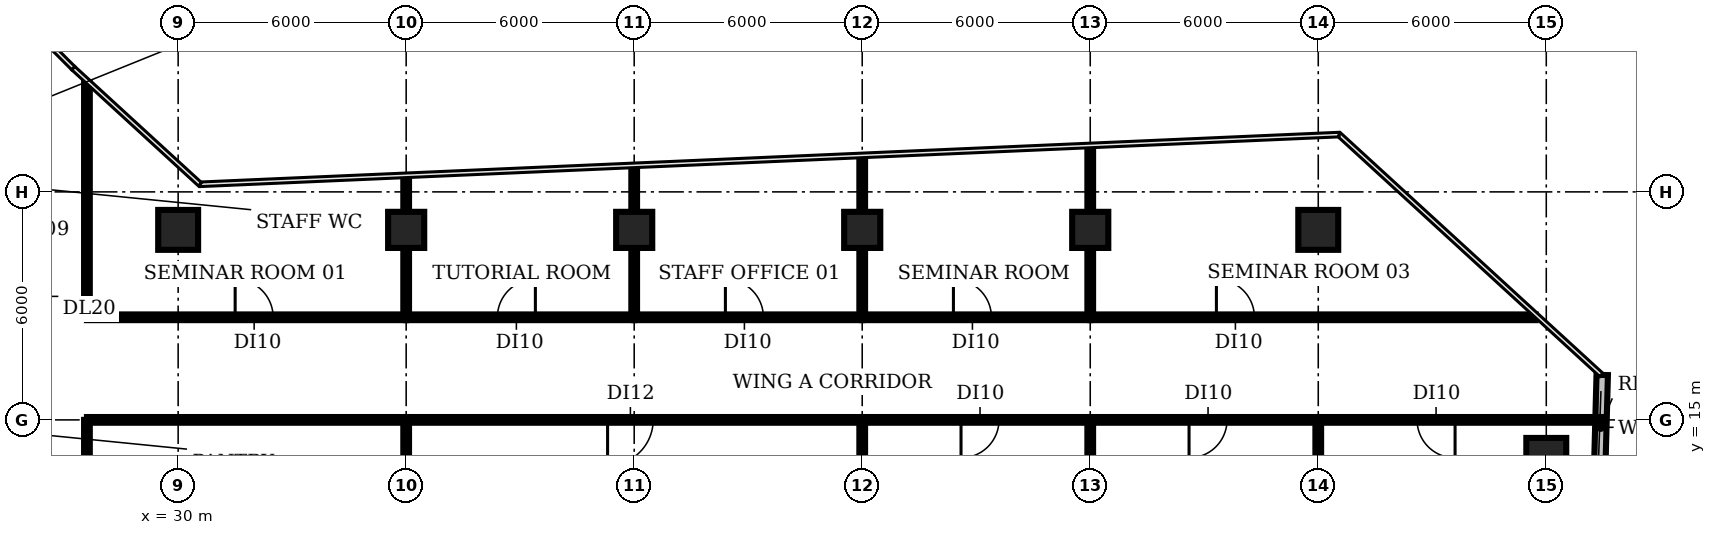
"""IFC4 building model, lengths in metres.
Left out: names, types, materials, properties, quantities, classifications, styles, units other than length and angle.
Written with IfcOpenShell. Run it as: python <this file> out.ifc"""

import sys

from ifc_helpers import new_model, si_unit, direction, frame, frame_2d, origin, origin_2d, place, context, subcontext, project, spatial, rectangle, circle, extrude, element, fill, save


model = new_model("IFC4")
c1 = context("Model", 3, precision=1e-05, world=origin(), true_north=direction((0.0, 1.0)))
c2 = subcontext(c1, "Body", "Model", "MODEL_VIEW")
j1 = project(units=[si_unit("LENGTHUNIT", "METRE"), si_unit("PLANEANGLEUNIT", "RADIAN")], contexts=[c1])
p1 = place(None, origin())
s1 = spatial("IfcSite", under=j1, at=p1, CompositionType="ELEMENT")
p2 = place(p1, origin())
s2 = spatial("IfcBuilding", under=s1, at=p2, CompositionType="ELEMENT")
p3 = place(p2, frame((0.0, 0.0, 62.6)))
s3 = spatial("IfcBuildingStorey", under=s2, at=p3, CompositionType="ELEMENT", Elevation=62.6)
p4 = place(p3, frame((30.0, 20.0, 0.0), z_axis=(0.0, 0.0, 1.0), x_axis=(1.0, 0.0, 0.0)))
e1 = element("IfcColumn", 1, at=p4, inside=s3, PredefinedType="COLUMN", context=c2, shape_type="SweptSolid", body=[
    extrude(circle(Radius=0.525, at=origin_2d()), origin(), (0.0, 0.0, 1.0), 3.85),
])
for number, where, z_axis, x_axis in (
    (2, (36.0, 20.0, 0.0), (0.0, 0.0, 1.0), (1.0, 0.0, 0.0)),
    (3, (42.0, 20.0, 0.0), (0.0, 0.0, 1.0), (1.0, 0.0, 0.0)),
    (4, (48.0, 20.0, 0.0), (0.0, 0.0, 1.0), (1.0, 0.0, 0.0)),
    (5, (54.0, 20.0, 0.0), (0.0, 0.0, 1.0), (1.0, 0.0, 0.0)),
):
    element("IfcColumn", number, at=place(p3, frame(where, z_axis=z_axis, x_axis=x_axis)), inside=s3, PredefinedType="COLUMN", context=c2, shape_type="SweptSolid", body=[
        extrude(rectangle(XDim=0.95, YDim=0.95, at=origin_2d()), origin(), (0.0, 0.0, 1.0), 3.85),
    ])
for number, where, z_axis, x_axis in (
    (6, (60.0, 20.0, 0.0), (0.0, 0.0, 1.0), (1.0, 0.0, 0.0)),
    (7, (66.0, 14.0, 0.0), (0.0, 0.0, 1.0), (1.0, 0.0, 0.0)),
):
    element("IfcColumn", number, at=place(p3, frame(where, z_axis=z_axis, x_axis=x_axis)), inside=s3, PredefinedType="COLUMN", context=c2, shape_type="SweptSolid", body=[
        extrude(circle(Radius=0.525, at=origin_2d()), origin(), (0.0, 0.0, 1.0), 3.85),
    ])
p5 = place(p3, frame((67.398, 13.427, 0.0), z_axis=(0.0, 0.0, 1.0), x_axis=(0.026746873039, 0.999642238395, 0.0)))
e8 = element("IfcWall", 8, at=p5, inside=s3, PredefinedType="SOLIDWALL", context=c2, shape_type="SweptSolid", body=[
    extrude(rectangle(XDim=2.757, YDim=0.3, at=frame_2d((1.378, 0.0))), origin(), (0.0, 0.0, 1.0), 3.85),
])
p6 = place(p3, frame((27.6, 15.0, 0.0), z_axis=(0.0, 0.0, 1.0), x_axis=(0.0, -1.0, 0.0)))
e9 = element("IfcWall", 9, at=p6, inside=s3, PredefinedType="PARTITIONING", context=c2, shape_type="SweptSolid", body=[
    extrude(rectangle(XDim=10.5, YDim=0.15, at=frame_2d((5.25, 0.0))), origin(), (0.0, 0.0, 1.0), 2.83),
])
p7 = place(p6, frame((4.8, 0.0, 0.0)))
e10 = element("IfcOpeningElement", 10, at=p7, cuts=e9, PredefinedType="OPENING", context=c2, shape_type="SweptSolid", body=[
    extrude(rectangle(XDim=1.0, YDim=2.1, at=frame_2d((0.5, 1.05))), frame((0.0, 0.085, 0.0), z_axis=(0.0, -1.0, 0.0), x_axis=(1.0, 0.0, 0.0)), (0.0, 0.0, 1.0), 0.17),
])
p8 = place(p3, frame((27.6, 15.0, 0.0), z_axis=(0.0, 0.0, 1.0), x_axis=(1.0, 0.0, 0.0)))
e11 = element("IfcWall", 11, at=p8, inside=s3, PredefinedType="PARTITIONING", context=c2, shape_type="SweptSolid", body=[
    extrude(rectangle(XDim=8.4, YDim=0.15, at=frame_2d((4.2, 0.0))), origin(), (0.0, 0.0, 1.0), 2.83),
])
p9 = place(p3, frame((27.6, 17.7, 0.0), z_axis=(0.0, 0.0, 1.0), x_axis=(0.0, 1.0, 0.0)))
e12 = element("IfcWall", 12, at=p9, inside=s3, PredefinedType="PARTITIONING", context=c2, shape_type="SweptSolid", body=[
    extrude(rectangle(XDim=6.16, YDim=0.15, at=frame_2d((3.08, 0.0))), origin(), (0.0, 0.0, 1.0), 2.83),
])
p10 = place(p3, frame((27.6, 17.7, 0.0), z_axis=(0.0, 0.0, 1.0), x_axis=(1.0, 0.0, 0.0)))
e13 = element("IfcWall", 13, at=p10, inside=s3, PredefinedType="PARTITIONING", context=c2, shape_type="SweptSolid", body=[
    extrude(rectangle(XDim=8.4, YDim=0.15, at=frame_2d((4.2, 0.0))), origin(), (0.0, 0.0, 1.0), 2.83),
])
p11 = place(p10, frame((3.9, 0.0, 0.0)))
e14 = element("IfcOpeningElement", 14, at=p11, cuts=e13, PredefinedType="OPENING", context=c2, shape_type="SweptSolid", body=[
    extrude(rectangle(XDim=1.0, YDim=2.1, at=frame_2d((0.5, 1.05))), frame((0.0, 0.085, 0.0), z_axis=(0.0, -1.0, 0.0), x_axis=(1.0, 0.0, 0.0)), (0.0, 0.0, 1.0), 0.17),
])
p12 = place(p3, frame((36.0, -5.01, 0.0), z_axis=(0.0, 0.0, 1.0), x_axis=(0.0, 1.0, 0.0)))
e15 = element("IfcWall", 15, at=p12, inside=s3, PredefinedType="PARTITIONING", context=c2, shape_type="SweptSolid", body=[
    extrude(rectangle(XDim=20.01, YDim=0.15, at=frame_2d((10.005, 0.0))), origin(), (0.0, 0.0, 1.0), 2.83),
])
p13 = place(p3, frame((36.0, 17.7, 0.0), z_axis=(0.0, 0.0, 1.0), x_axis=(0.0, 1.0, 0.0)))
e16 = element("IfcWall", 16, at=p13, inside=s3, PredefinedType="PARTITIONING", context=c2, shape_type="SweptSolid", body=[
    extrude(rectangle(XDim=3.69, YDim=0.15, at=frame_2d((1.845, 0.0))), origin(), (0.0, 0.0, 1.0), 2.83),
])
p14 = place(p3, frame((36.0, 17.7, 0.0), z_axis=(0.0, 0.0, 1.0), x_axis=(1.0, 0.0, 0.0)))
e17 = element("IfcWall", 17, at=p14, inside=s3, PredefinedType="PARTITIONING", context=c2, shape_type="SweptSolid", body=[
    extrude(rectangle(XDim=6.0, YDim=0.15, at=frame_2d((3.0, 0.0))), origin(), (0.0, 0.0, 1.0), 2.83),
])
p15 = place(p14, frame((2.4, 0.0, 0.0)))
e18 = element("IfcOpeningElement", 18, at=p15, cuts=e17, PredefinedType="OPENING", context=c2, shape_type="SweptSolid", body=[
    extrude(rectangle(XDim=1.0, YDim=2.1, at=frame_2d((0.5, 1.05))), frame((0.0, 0.085, 0.0), z_axis=(0.0, -1.0, 0.0), x_axis=(1.0, 0.0, 0.0)), (0.0, 0.0, 1.0), 0.17),
])
p16 = place(p3, frame((42.0, 17.7, 0.0), z_axis=(0.0, 0.0, 1.0), x_axis=(0.0, 1.0, 0.0)))
e19 = element("IfcWall", 19, at=p16, inside=s3, PredefinedType="PARTITIONING", context=c2, shape_type="SweptSolid", body=[
    extrude(rectangle(XDim=3.95, YDim=0.15, at=frame_2d((1.975, 0.0))), origin(), (0.0, 0.0, 1.0), 2.83),
])
p17 = place(p3, frame((42.0, 17.7, 0.0), z_axis=(0.0, 0.0, 1.0), x_axis=(1.0, 0.0, 0.0)))
e20 = element("IfcWall", 20, at=p17, inside=s3, PredefinedType="PARTITIONING", context=c2, shape_type="SweptSolid", body=[
    extrude(rectangle(XDim=6.0, YDim=0.15, at=frame_2d((3.0, 0.0))), origin(), (0.0, 0.0, 1.0), 2.83),
])
p18 = place(p17, frame((2.4, 0.0, 0.0)))
e21 = element("IfcOpeningElement", 21, at=p18, cuts=e20, PredefinedType="OPENING", context=c2, shape_type="SweptSolid", body=[
    extrude(rectangle(XDim=1.0, YDim=2.1, at=frame_2d((0.5, 1.05))), frame((0.0, 0.085, 0.0), z_axis=(0.0, -1.0, 0.0), x_axis=(1.0, 0.0, 0.0)), (0.0, 0.0, 1.0), 0.17),
])
p19 = place(p3, frame((48.0, -5.01, 0.0), z_axis=(0.0, 0.0, 1.0), x_axis=(0.0, 1.0, 0.0)))
e22 = element("IfcWall", 22, at=p19, inside=s3, PredefinedType="PARTITIONING", context=c2, shape_type="SweptSolid", body=[
    extrude(rectangle(XDim=20.01, YDim=0.15, at=frame_2d((10.005, 0.0))), origin(), (0.0, 0.0, 1.0), 2.83),
])
p20 = place(p3, frame((48.0, 15.0, 0.0), z_axis=(0.0, 0.0, 1.0), x_axis=(-1.0, 0.0, 0.0)))
e23 = element("IfcWall", 23, at=p20, inside=s3, PredefinedType="PARTITIONING", context=c2, shape_type="SweptSolid", body=[
    extrude(rectangle(XDim=12.0, YDim=0.15, at=frame_2d((6.0, 0.0))), origin(), (0.0, 0.0, 1.0), 2.83),
])
p21 = place(p20, frame((5.5, 0.0, 0.0)))
e24 = element("IfcOpeningElement", 24, at=p21, cuts=e23, PredefinedType="OPENING", context=c2, shape_type="SweptSolid", body=[
    extrude(rectangle(XDim=1.2, YDim=2.1, at=frame_2d((0.6, 1.05))), frame((0.0, 0.085, 0.0), z_axis=(0.0, -1.0, 0.0), x_axis=(1.0, 0.0, 0.0)), (0.0, 0.0, 1.0), 0.17),
])
p22 = place(p3, frame((48.0, 17.7, 0.0), z_axis=(0.0, 0.0, 1.0), x_axis=(0.0, 1.0, 0.0)))
e25 = element("IfcWall", 25, at=p22, inside=s3, PredefinedType="PARTITIONING", context=c2, shape_type="SweptSolid", body=[
    extrude(rectangle(XDim=4.21, YDim=0.15, at=frame_2d((2.105, 0.0))), origin(), (0.0, 0.0, 1.0), 2.83),
])
p23 = place(p3, frame((48.0, 17.7, 0.0), z_axis=(0.0, 0.0, 1.0), x_axis=(1.0, 0.0, 0.0)))
e26 = element("IfcWall", 26, at=p23, inside=s3, PredefinedType="PARTITIONING", context=c2, shape_type="SweptSolid", body=[
    extrude(rectangle(XDim=6.0, YDim=0.15, at=frame_2d((3.0, 0.0))), origin(), (0.0, 0.0, 1.0), 2.83),
])
p24 = place(p23, frame((2.4, 0.0, 0.0)))
e27 = element("IfcOpeningElement", 27, at=p24, cuts=e26, PredefinedType="OPENING", context=c2, shape_type="SweptSolid", body=[
    extrude(rectangle(XDim=1.0, YDim=2.1, at=frame_2d((0.5, 1.05))), frame((0.0, 0.085, 0.0), z_axis=(0.0, -1.0, 0.0), x_axis=(1.0, 0.0, 0.0)), (0.0, 0.0, 1.0), 0.17),
])
p25 = place(p3, frame((54.0, -4.993, 0.0), z_axis=(0.0, 0.0, 1.0), x_axis=(0.0, 1.0, 0.0)))
e28 = element("IfcWall", 28, at=p25, inside=s3, PredefinedType="PARTITIONING", context=c2, shape_type="SweptSolid", body=[
    extrude(rectangle(XDim=19.993, YDim=0.15, at=frame_2d((9.997, 0.0))), origin(), (0.0, 0.0, 1.0), 2.83),
])
p26 = place(p3, frame((54.0, 15.0, 0.0), z_axis=(0.0, 0.0, 1.0), x_axis=(-1.0, 0.0, 0.0)))
e29 = element("IfcWall", 29, at=p26, inside=s3, PredefinedType="PARTITIONING", context=c2, shape_type="SweptSolid", body=[
    extrude(rectangle(XDim=6.0, YDim=0.15, at=frame_2d((3.0, 0.0))), origin(), (0.0, 0.0, 1.0), 2.83),
])
p27 = place(p26, frame((2.4, 0.0, 0.0)))
e30 = element("IfcOpeningElement", 30, at=p27, cuts=e29, PredefinedType="OPENING", context=c2, shape_type="SweptSolid", body=[
    extrude(rectangle(XDim=1.0, YDim=2.1, at=frame_2d((0.5, 1.05))), frame((0.0, 0.085, 0.0), z_axis=(0.0, -1.0, 0.0), x_axis=(1.0, 0.0, 0.0)), (0.0, 0.0, 1.0), 0.17),
])
p28 = place(p3, frame((54.0, 17.7, 0.0), z_axis=(0.0, 0.0, 1.0), x_axis=(0.0, 1.0, 0.0)))
e31 = element("IfcWall", 31, at=p28, inside=s3, PredefinedType="PARTITIONING", context=c2, shape_type="SweptSolid", body=[
    extrude(rectangle(XDim=4.47, YDim=0.15, at=frame_2d((2.235, 0.0))), origin(), (0.0, 0.0, 1.0), 2.83),
])
p29 = place(p3, frame((54.0, 17.7, 0.0), z_axis=(0.0, 0.0, 1.0), x_axis=(1.0, 0.0, 0.0)))
e32 = element("IfcWall", 32, at=p29, inside=s3, PredefinedType="PARTITIONING", context=c2, shape_type="SweptSolid", body=[
    extrude(rectangle(XDim=11.72, YDim=0.15, at=frame_2d((5.86, 0.0))), origin(), (0.0, 0.0, 1.0), 2.83),
])
p30 = place(p29, frame((3.32, 0.0, 0.0)))
e33 = element("IfcOpeningElement", 33, at=p30, cuts=e32, PredefinedType="OPENING", context=c2, shape_type="SweptSolid", body=[
    extrude(rectangle(XDim=1.0, YDim=2.1, at=frame_2d((0.5, 1.05))), frame((0.0, 0.085, 0.0), z_axis=(0.0, -1.0, 0.0), x_axis=(1.0, 0.0, 0.0)), (0.0, 0.0, 1.0), 0.17),
])
p31 = place(p3, frame((60.0, -5.01, 0.0), z_axis=(0.0, 0.0, 1.0), x_axis=(0.0, 1.0, 0.0)))
e34 = element("IfcWall", 34, at=p31, inside=s3, PredefinedType="PARTITIONING", context=c2, shape_type="SweptSolid", body=[
    extrude(rectangle(XDim=20.01, YDim=0.15, at=frame_2d((10.005, 0.0))), origin(), (0.0, 0.0, 1.0), 2.83),
])
p32 = place(p3, frame((60.0, 15.0, 0.0), z_axis=(0.0, 0.0, 1.0), x_axis=(-1.0, 0.0, 0.0)))
e35 = element("IfcWall", 35, at=p32, inside=s3, PredefinedType="PARTITIONING", context=c2, shape_type="SweptSolid", body=[
    extrude(rectangle(XDim=6.0, YDim=0.15, at=frame_2d((3.0, 0.0))), origin(), (0.0, 0.0, 1.0), 2.83),
])
p33 = place(p32, frame((2.4, 0.0, 0.0)))
e36 = element("IfcOpeningElement", 36, at=p33, cuts=e35, PredefinedType="OPENING", context=c2, shape_type="SweptSolid", body=[
    extrude(rectangle(XDim=1.0, YDim=2.1, at=frame_2d((0.5, 1.05))), frame((0.0, 0.085, 0.0), z_axis=(0.0, -1.0, 0.0), x_axis=(1.0, 0.0, 0.0)), (0.0, 0.0, 1.0), 0.17),
])
p34 = place(p3, frame((67.478, 15.0, 0.0), z_axis=(0.0, 0.0, 1.0), x_axis=(-1.0, 0.0, 0.0)))
e37 = element("IfcWall", 37, at=p34, inside=s3, PredefinedType="PARTITIONING", context=c2, shape_type="SweptSolid", body=[
    extrude(rectangle(XDim=7.478, YDim=0.15, at=frame_2d((3.739, 0.0))), origin(), (0.0, 0.0, 1.0), 2.83),
])
p35 = place(p34, frame((3.878, 0.0, 0.0)))
e38 = element("IfcOpeningElement", 38, at=p35, cuts=e37, PredefinedType="OPENING", context=c2, shape_type="SweptSolid", body=[
    extrude(rectangle(XDim=1.0, YDim=2.1, at=frame_2d((0.5, 1.05))), frame((0.0, 0.085, 0.0), z_axis=(0.0, -1.0, 0.0), x_axis=(1.0, 0.0, 0.0)), (0.0, 0.0, 1.0), 0.17),
])
p36 = place(p11, origin())
e39 = element("IfcDoor", 39, at=p36, inside=s3, OperationType="SINGLE_SWING_LEFT", PredefinedType="DOOR", context=c2, shape_type="SweptSolid", body=[
    extrude(rectangle(XDim=1.0, YDim=2.1, at=frame_2d((0.5, 1.05))), frame((0.0, 0.025, 0.0), z_axis=(0.0, -1.0, 0.0), x_axis=(1.0, 0.0, 0.0)), (0.0, 0.0, 1.0), 0.05),
])
fill(e14, e39)
p37 = place(p15, origin())
e40 = element("IfcDoor", 40, at=p37, inside=s3, OperationType="SINGLE_SWING_RIGHT", PredefinedType="DOOR", context=c2, shape_type="SweptSolid", body=[
    extrude(rectangle(XDim=1.0, YDim=2.1, at=frame_2d((0.5, 1.05))), frame((0.0, 0.025, 0.0), z_axis=(0.0, -1.0, 0.0), x_axis=(1.0, 0.0, 0.0)), (0.0, 0.0, 1.0), 0.05),
])
fill(e18, e40)
p38 = place(p18, origin())
e41 = element("IfcDoor", 41, at=p38, inside=s3, OperationType="SINGLE_SWING_LEFT", PredefinedType="DOOR", context=c2, shape_type="SweptSolid", body=[
    extrude(rectangle(XDim=1.0, YDim=2.1, at=frame_2d((0.5, 1.05))), frame((0.0, 0.025, 0.0), z_axis=(0.0, -1.0, 0.0), x_axis=(1.0, 0.0, 0.0)), (0.0, 0.0, 1.0), 0.05),
])
fill(e21, e41)
p39 = place(p21, origin())
e42 = element("IfcDoor", 42, at=p39, inside=s3, OperationType="SINGLE_SWING_RIGHT", PredefinedType="DOOR", context=c2, shape_type="SweptSolid", body=[
    extrude(rectangle(XDim=1.2, YDim=2.1, at=frame_2d((0.6, 1.05))), frame((0.0, 0.025, 0.0), z_axis=(0.0, -1.0, 0.0), x_axis=(1.0, 0.0, 0.0)), (0.0, 0.0, 1.0), 0.05),
])
fill(e24, e42)
p40 = place(p24, origin())
e43 = element("IfcDoor", 43, at=p40, inside=s3, OperationType="SINGLE_SWING_LEFT", PredefinedType="DOOR", context=c2, shape_type="SweptSolid", body=[
    extrude(rectangle(XDim=1.0, YDim=2.1, at=frame_2d((0.5, 1.05))), frame((0.0, 0.025, 0.0), z_axis=(0.0, -1.0, 0.0), x_axis=(1.0, 0.0, 0.0)), (0.0, 0.0, 1.0), 0.05),
])
fill(e27, e43)
p41 = place(p27, origin())
e44 = element("IfcDoor", 44, at=p41, inside=s3, OperationType="SINGLE_SWING_RIGHT", PredefinedType="DOOR", context=c2, shape_type="SweptSolid", body=[
    extrude(rectangle(XDim=1.0, YDim=2.1, at=frame_2d((0.5, 1.05))), frame((0.0, 0.025, 0.0), z_axis=(0.0, -1.0, 0.0), x_axis=(1.0, 0.0, 0.0)), (0.0, 0.0, 1.0), 0.05),
])
fill(e30, e44)
p42 = place(p30, origin())
e45 = element("IfcDoor", 45, at=p42, inside=s3, OperationType="SINGLE_SWING_LEFT", PredefinedType="DOOR", context=c2, shape_type="SweptSolid", body=[
    extrude(rectangle(XDim=1.0, YDim=2.1, at=frame_2d((0.5, 1.05))), frame((0.0, 0.025, 0.0), z_axis=(0.0, -1.0, 0.0), x_axis=(1.0, 0.0, 0.0)), (0.0, 0.0, 1.0), 0.05),
])
fill(e33, e45)
p43 = place(p33, origin())
e46 = element("IfcDoor", 46, at=p43, inside=s3, OperationType="SINGLE_SWING_RIGHT", PredefinedType="DOOR", context=c2, shape_type="SweptSolid", body=[
    extrude(rectangle(XDim=1.0, YDim=2.1, at=frame_2d((0.5, 1.05))), frame((0.0, 0.025, 0.0), z_axis=(0.0, -1.0, 0.0), x_axis=(1.0, 0.0, 0.0)), (0.0, 0.0, 1.0), 0.05),
])
fill(e36, e46)
p44 = place(p35, origin())
e47 = element("IfcDoor", 47, at=p44, inside=s3, OperationType="SINGLE_SWING_LEFT", PredefinedType="DOOR", context=c2, shape_type="SweptSolid", body=[
    extrude(rectangle(XDim=1.0, YDim=2.1, at=frame_2d((0.5, 1.05))), frame((0.0, 0.025, 0.0), z_axis=(0.0, -1.0, 0.0), x_axis=(1.0, 0.0, 0.0)), (0.0, 0.0, 1.0), 0.05),
])
fill(e38, e47)
save(model, sys.argv[1])
